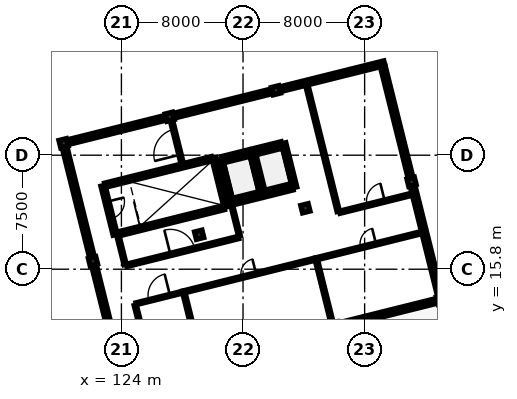
"""IFC4 building model, lengths in metres.
Left out: names, types, materials, properties, quantities, classifications, styles, units other than length and angle.
Written with IfcOpenShell. Run it as: python <this file> out.ifc"""

import sys

from ifc_helpers import new_model, si_unit, direction, frame, frame_2d, origin, origin_2d, place, context, subcontext, project, spatial, rectangle, extrude, element, fill, save


model = new_model("IFC4")
c1 = context("Model", 3, precision=1e-05, world=origin(), true_north=direction((0.0, 1.0)))
c2 = subcontext(c1, "Body", "Model", "MODEL_VIEW")
j1 = project(units=[si_unit("LENGTHUNIT", "METRE"), si_unit("PLANEANGLEUNIT", "RADIAN")], contexts=[c1])
p1 = place(None, origin())
s1 = spatial("IfcSite", under=j1, at=p1, CompositionType="ELEMENT")
p2 = place(p1, origin())
s2 = spatial("IfcBuilding", under=s1, at=p2, CompositionType="ELEMENT")
p3 = place(p2, frame((0.0, 0.0, 25.5)))
s3 = spatial("IfcBuildingStorey", under=s2, at=p3, CompositionType="ELEMENT", Elevation=25.5)
for number, where, z_axis, x_axis in (
    (1, (122.129, 16.325, 0.0), (0.0, 0.0, 1.0), (0.97, 0.242, 0.0)),
    (2, (120.194, 24.087, 0.0), (0.0, 0.0, 1.0), (0.97, 0.242, 0.0)),
):
    element("IfcColumn", number, at=place(p3, frame(where, z_axis=z_axis, x_axis=x_axis)), inside=s3, PredefinedType="COLUMN", context=c2, shape_type="SweptSolid", body=[
        extrude(rectangle(XDim=0.5, YDim=0.5, at=origin_2d()), origin(), (0.0, 0.0, 1.0), 3.819),
    ])
for number, where, z_axis, x_axis in (
    (3, (129.115, 18.067, 0.0), (0.0, 0.0, 1.0), (0.97, 0.242, 0.0)),
    (4, (127.18, 25.829, 0.0), (0.0, 0.0, 1.0), (0.97, 0.242, 0.0)),
):
    element("IfcColumn", number, at=place(p3, frame(where, z_axis=z_axis, x_axis=x_axis)), inside=s3, PredefinedType="COLUMN", context=c2, shape_type="SweptSolid", body=[
        extrude(rectangle(XDim=0.5, YDim=0.5, at=origin_2d()), origin(), (0.0, 0.0, 1.0), 4.42),
    ])
for number, where, z_axis, x_axis in (
    (5, (136.102, 19.808, 0.0), (0.0, 0.0, 1.0), (0.97, 0.242, 0.0)),
    (6, (134.166, 27.571, 0.0), (0.0, 0.0, 1.0), (0.97, 0.242, 0.0)),
):
    element("IfcColumn", number, at=place(p3, frame(where, z_axis=z_axis, x_axis=x_axis)), inside=s3, PredefinedType="COLUMN", context=c2, shape_type="SweptSolid", body=[
        extrude(rectangle(XDim=0.5, YDim=0.5, at=origin_2d()), origin(), (0.0, 0.0, 1.0), 3.818),
    ])
for number, where, z_axis, x_axis in (
    (7, (145.023, 13.788, 0.0), (0.0, 0.0, 1.0), (0.97, 0.242, 0.0)),
    (8, (143.088, 21.55, 0.0), (0.0, 0.0, 1.0), (0.97, 0.242, 0.0)),
):
    element("IfcColumn", number, at=place(p3, frame(where, z_axis=z_axis, x_axis=x_axis)), inside=s3, PredefinedType="COLUMN", context=c2, shape_type="SweptSolid", body=[
        extrude(rectangle(XDim=0.5, YDim=0.5, at=origin_2d()), origin(), (0.0, 0.0, 1.0), 4.738),
    ])
p4 = place(p3, frame((120.437, 24.147, 0.0), z_axis=(0.0, 0.0, 1.0), x_axis=(0.970288079516, 0.241952563016, 0.0)))
e9 = element("IfcWall", 9, at=p4, inside=s3, PredefinedType="SOLIDWALL", context=c2, shape_type="SweptSolid", body=[
    extrude(rectangle(XDim=6.7, YDim=0.32, at=frame_2d((3.35, 0.0))), origin(), (0.0, 0.0, 1.0), 3.7),
])
p5 = place(p4, frame((2.65, 0.0, 0.9)))
e10 = element("IfcOpeningElement", 10, at=p5, cuts=e9, PredefinedType="OPENING", context=c2, shape_type="SweptSolid", body=[
    extrude(rectangle(XDim=1.4, YDim=1.5, at=frame_2d((0.7, 0.75))), frame((0.0, 0.172, 0.0), z_axis=(0.0, -1.0, 0.0), x_axis=(1.0, 0.0, 0.0)), (0.0, 0.0, 1.0), 0.344),
])
p6 = place(p3, frame((127.423, 25.889, 0.0), z_axis=(0.0, 0.0, 1.0), x_axis=(0.970296633454, 0.241918257079, 0.0)))
e11 = element("IfcWall", 11, at=p6, inside=s3, PredefinedType="SOLIDWALL", context=c2, shape_type="SweptSolid", body=[
    extrude(rectangle(XDim=6.7, YDim=0.32, at=frame_2d((3.35, 0.0))), origin(), (0.0, 0.0, 1.0), 3.7),
])
p7 = place(p6, frame((2.65, 0.0, 0.9)))
e12 = element("IfcOpeningElement", 12, at=p7, cuts=e11, PredefinedType="OPENING", context=c2, shape_type="SweptSolid", body=[
    extrude(rectangle(XDim=1.4, YDim=1.7, at=frame_2d((0.7, 0.85))), frame((0.0, 0.172, 0.0), z_axis=(0.0, -1.0, 0.0), x_axis=(1.0, 0.0, 0.0)), (0.0, 0.0, 1.0), 0.344),
])
p8 = place(p3, frame((134.409, 27.631, 0.0), z_axis=(0.0, 0.0, 1.0), x_axis=(0.97030006528, 0.241904492141, 0.0)))
e13 = element("IfcWall", 13, at=p8, inside=s3, PredefinedType="SOLIDWALL", context=c2, shape_type="SweptSolid", body=[
    extrude(rectangle(XDim=7.1, YDim=0.32, at=frame_2d((3.55, 0.0))), origin(), (0.0, 0.0, 1.0), 3.7),
])
p9 = place(p3, frame((141.188, 29.167, 0.0), z_axis=(0.0, 0.0, 1.0), x_axis=(0.241923337436, -0.970295366785, 0.0)))
e14 = element("IfcWall", 14, at=p9, inside=s3, PredefinedType="SOLIDWALL", context=c2, shape_type="SweptSolid", body=[
    extrude(rectangle(XDim=7.6, YDim=0.32, at=frame_2d((3.8, 0.0))), origin(), (0.0, 0.0, 1.0), 3.7),
])
p10 = place(p9, frame((2.7, 0.0, 0.9)))
e15 = element("IfcOpeningElement", 15, at=p10, cuts=e14, PredefinedType="OPENING", context=c2, shape_type="SweptSolid", body=[
    extrude(rectangle(XDim=2.2, YDim=1.9, at=frame_2d((1.1, 0.95))), frame((0.0, 0.172, 0.0), z_axis=(0.0, -1.0, 0.0), x_axis=(1.0, 0.0, 0.0)), (0.0, 0.0, 1.0), 0.344),
])
p11 = place(p3, frame((143.148, 21.308, 0.0), z_axis=(0.0, 0.0, 1.0), x_axis=(0.241930483572, -0.970293585014, 0.0)))
e16 = element("IfcWall", 16, at=p11, inside=s3, PredefinedType="SOLIDWALL", context=c2, shape_type="SweptSolid", body=[
    extrude(rectangle(XDim=7.5, YDim=0.32, at=frame_2d((3.75, 0.0))), origin(), (0.0, 0.0, 1.0), 3.7),
])
p12 = place(p3, frame((144.781, 13.727, 0.0), z_axis=(0.0, 0.0, 1.0), x_axis=(-0.970296633454, -0.241918257079, 0.0)))
e17 = element("IfcWall", 17, at=p12, inside=s3, PredefinedType="SOLIDWALL", context=c2, shape_type="SweptSolid", body=[
    extrude(rectangle(XDim=6.7, YDim=0.32, at=frame_2d((3.35, 0.0))), origin(), (0.0, 0.0, 1.0), 3.7),
])
p13 = place(p12, frame((2.55, 0.0, 0.9)))
e18 = element("IfcOpeningElement", 18, at=p13, cuts=e17, PredefinedType="OPENING", context=c2, shape_type="SweptSolid", body=[
    extrude(rectangle(XDim=1.6, YDim=1.3, at=frame_2d((0.8, 0.65))), frame((0.0, 0.172, 0.0), z_axis=(0.0, -1.0, 0.0), x_axis=(1.0, 0.0, 0.0)), (0.0, 0.0, 1.0), 0.344),
])
p14 = place(p3, frame((124.004, 8.805, 0.0), z_axis=(0.0, 0.0, 1.0), x_axis=(-0.241922842305, 0.970295490235, 0.0)))
e19 = element("IfcWall", 19, at=p14, inside=s3, PredefinedType="SOLIDWALL", context=c2, shape_type="SweptSolid", body=[
    extrude(rectangle(XDim=7.5, YDim=0.32, at=frame_2d((3.75, 0.0))), origin(), (0.0, 0.0, 1.0), 3.7),
])
p15 = place(p14, frame((2.75, 0.0, 0.9)))
e20 = element("IfcOpeningElement", 20, at=p15, cuts=e19, PredefinedType="OPENING", context=c2, shape_type="SweptSolid", body=[
    extrude(rectangle(XDim=2.0, YDim=1.9, at=frame_2d((1.0, 0.95))), frame((0.0, 0.172, 0.0), z_axis=(0.0, -1.0, 0.0), x_axis=(1.0, 0.0, 0.0)), (0.0, 0.0, 1.0), 0.344),
])
p16 = place(p3, frame((122.069, 16.567, 0.0), z_axis=(0.0, 0.0, 1.0), x_axis=(-0.241930483572, 0.970293585014, 0.0)))
e21 = element("IfcWall", 21, at=p16, inside=s3, PredefinedType="SOLIDWALL", context=c2, shape_type="SweptSolid", body=[
    extrude(rectangle(XDim=7.5, YDim=0.32, at=frame_2d((3.75, 0.0))), origin(), (0.0, 0.0, 1.0), 3.7),
])
p17 = place(p16, frame((2.85, 0.0, 0.9)))
e22 = element("IfcOpeningElement", 22, at=p17, cuts=e21, PredefinedType="OPENING", context=c2, shape_type="SweptSolid", body=[
    extrude(rectangle(XDim=1.8, YDim=1.3, at=frame_2d((0.9, 0.65))), frame((0.0, 0.172, 0.0), z_axis=(0.0, -1.0, 0.0), x_axis=(1.0, 0.0, 0.0)), (0.0, 0.0, 1.0), 0.344),
])
p18 = place(p3, frame((123.731, 18.105, 0.0), z_axis=(0.0, 0.0, 1.0), x_axis=(0.970297238923, 0.241915828623, 0.0)))
e23 = element("IfcWall", 23, at=p18, inside=s3, PredefinedType="SHEAR", context=c2, shape_type="SweptSolid", body=[
    extrude(rectangle(XDim=7.23, YDim=0.28, at=frame_2d((3.615, 0.0))), origin(), (0.0, 0.0, 1.0), 3.8),
])
p19 = place(p3, frame((130.887, 19.889, 0.0), z_axis=(0.0, 0.0, 1.0), x_axis=(-0.241947258837, 0.970289402158, 0.0)))
e24 = element("IfcWall", 24, at=p19, inside=s3, PredefinedType="SHEAR", context=c2, shape_type="SweptSolid", body=[
    extrude(rectangle(XDim=3.32, YDim=0.28, at=frame_2d((1.66, 0.0))), origin(), (0.0, 0.0, 1.0), 3.8),
])
p20 = place(p3, frame((129.943, 23.076, 0.0), z_axis=(0.0, 0.0, 1.0), x_axis=(-0.970289312034, -0.241947620266, 0.0)))
e25 = element("IfcWall", 25, at=p20, inside=s3, PredefinedType="SHEAR", context=c2, shape_type="SweptSolid", body=[
    extrude(rectangle(XDim=7.23, YDim=0.28, at=frame_2d((3.615, 0.0))), origin(), (0.0, 0.0, 1.0), 3.8),
])
p21 = place(p3, frame((122.787, 21.292, 0.0), z_axis=(0.0, 0.0, 1.0), x_axis=(0.241860763027, -0.970310966293, 0.0)))
e26 = element("IfcWall", 26, at=p21, inside=s3, PredefinedType="SHEAR", context=c2, shape_type="SweptSolid", body=[
    extrude(rectangle(XDim=3.32, YDim=0.28, at=frame_2d((1.66, 0.0))), origin(), (0.0, 0.0, 1.0), 3.8),
])
p22 = place(p21, frame((1.085, 0.0, 0.0)))
e27 = element("IfcOpeningElement", 27, at=p22, cuts=e26, PredefinedType="OPENING", context=c2, shape_type="SweptSolid", body=[
    extrude(rectangle(XDim=1.15, YDim=2.15, at=frame_2d((0.575, 1.075))), frame((0.0, 0.152, 0.0), z_axis=(0.0, -1.0, 0.0), x_axis=(1.0, 0.0, 0.0)), (0.0, 0.0, 1.0), 0.304),
])
p23 = place(p3, frame((131.363, 20.176, 0.0), z_axis=(0.0, 0.0, 1.0), x_axis=(0.970284587517, 0.241966566341, 0.0)))
e28 = element("IfcWall", 28, at=p23, inside=s3, PredefinedType="SHEAR", context=c2, shape_type="SweptSolid", body=[
    extrude(rectangle(XDim=1.817, YDim=0.28, at=frame_2d((0.909, 0.0))), origin(), (0.0, 0.0, 1.0), 5.3),
])
p24 = place(p3, frame((133.267, 20.651, 0.0), z_axis=(0.0, 0.0, 1.0), x_axis=(-0.241921647353, 0.970295788171, 0.0)))
e29 = element("IfcWall", 29, at=p24, inside=s3, PredefinedType="SHEAR", context=c2, shape_type="SweptSolid", body=[
    extrude(rectangle(XDim=2.994, YDim=0.28, at=frame_2d((1.497, 0.0))), origin(), (0.0, 0.0, 1.0), 5.3),
])
p25 = place(p3, frame((132.402, 23.521, 0.0), z_axis=(0.0, 0.0, 1.0), x_axis=(-0.970284587517, -0.241966566341, 0.0)))
e30 = element("IfcWall", 30, at=p25, inside=s3, PredefinedType="SHEAR", context=c2, shape_type="SweptSolid", body=[
    extrude(rectangle(XDim=1.817, YDim=0.28, at=frame_2d((0.909, 0.0))), origin(), (0.0, 0.0, 1.0), 5.3),
])
p26 = place(p25, frame((0.259, 0.0, 0.0)))
e31 = element("IfcOpeningElement", 31, at=p26, cuts=e30, PredefinedType="OPENING", context=c2, shape_type="SweptSolid", body=[
    extrude(rectangle(XDim=1.3, YDim=2.2, at=frame_2d((0.65, 1.1))), frame((0.0, 0.152, 0.0), z_axis=(0.0, -1.0, 0.0), x_axis=(1.0, 0.0, 0.0)), (0.0, 0.0, 1.0), 0.304),
])
p27 = place(p3, frame((130.498, 23.046, 0.0), z_axis=(0.0, 0.0, 1.0), x_axis=(0.241921647353, -0.970295788171, 0.0)))
e32 = element("IfcWall", 32, at=p27, inside=s3, PredefinedType="SHEAR", context=c2, shape_type="SweptSolid", body=[
    extrude(rectangle(XDim=2.994, YDim=0.28, at=frame_2d((1.497, 0.0))), origin(), (0.0, 0.0, 1.0), 5.3),
])
p28 = place(p3, frame((133.408, 20.686, 0.0), z_axis=(0.0, 0.0, 1.0), x_axis=(0.970285190026, 0.241964150272, 0.0)))
e33 = element("IfcWall", 33, at=p28, inside=s3, PredefinedType="SHEAR", context=c2, shape_type="SweptSolid", body=[
    extrude(rectangle(XDim=1.91, YDim=0.28, at=frame_2d((0.955, 0.0))), origin(), (0.0, 0.0, 1.0), 5.3),
])
p29 = place(p3, frame((135.402, 21.183, 0.0), z_axis=(0.0, 0.0, 1.0), x_axis=(-0.241921647353, 0.970295788171, 0.0)))
e34 = element("IfcWall", 34, at=p29, inside=s3, PredefinedType="SHEAR", context=c2, shape_type="SweptSolid", body=[
    extrude(rectangle(XDim=2.994, YDim=0.28, at=frame_2d((1.497, 0.0))), origin(), (0.0, 0.0, 1.0), 5.3),
])
p30 = place(p3, frame((134.537, 24.053, 0.0), z_axis=(0.0, 0.0, 1.0), x_axis=(-0.970285190026, -0.241964150272, 0.0)))
e35 = element("IfcWall", 35, at=p30, inside=s3, PredefinedType="SHEAR", context=c2, shape_type="SweptSolid", body=[
    extrude(rectangle(XDim=1.91, YDim=0.28, at=frame_2d((0.955, 0.0))), origin(), (0.0, 0.0, 1.0), 5.3),
])
p31 = place(p30, frame((0.305, 0.0, 0.0)))
e36 = element("IfcOpeningElement", 36, at=p31, cuts=e35, PredefinedType="OPENING", context=c2, shape_type="SweptSolid", body=[
    extrude(rectangle(XDim=1.3, YDim=2.2, at=frame_2d((0.65, 1.1))), frame((0.0, 0.152, 0.0), z_axis=(0.0, -1.0, 0.0), x_axis=(1.0, 0.0, 0.0)), (0.0, 0.0, 1.0), 0.304),
])
p32 = place(p3, frame((124.346, 16.053, 0.0), z_axis=(0.0, 0.0, 1.0), x_axis=(0.970295772287, 0.241921711059, 0.0)))
e37 = element("IfcWall", 37, at=p32, inside=s3, PredefinedType="PARTITIONING", context=c2, shape_type="SweptSolid", body=[
    extrude(rectangle(XDim=7.58, YDim=0.16, at=frame_2d((3.79, 0.0))), origin(), (0.0, 0.0, 1.0), 3.7),
])
p33 = place(p32, frame((2.965, 0.0, 0.0)))
e38 = element("IfcOpeningElement", 38, at=p33, cuts=e37, PredefinedType="OPENING", context=c2, shape_type="SweptSolid", body=[
    extrude(rectangle(XDim=1.65, YDim=2.32, at=frame_2d((0.825, 1.16))), frame((0.0, 0.092, 0.0), z_axis=(0.0, -1.0, 0.0), x_axis=(1.0, 0.0, 0.0)), (0.0, 0.0, 1.0), 0.184),
])
p34 = place(p3, frame((128.0, 22.748, 0.0), z_axis=(0.0, 0.0, 1.0), x_axis=(-0.24188769692, 0.970304252324, 0.0)))
e39 = element("IfcWall", 39, at=p34, inside=s3, PredefinedType="PARTITIONING", context=c2, shape_type="SweptSolid", body=[
    extrude(rectangle(XDim=2.926, YDim=0.16, at=frame_2d((1.463, 0.0))), origin(), (0.0, 0.0, 1.0), 3.7),
])
p35 = place(p34, frame((0.603, 0.0, 0.0)))
e40 = element("IfcOpeningElement", 40, at=p35, cuts=e39, PredefinedType="OPENING", context=c2, shape_type="SweptSolid", body=[
    extrude(rectangle(XDim=1.72, YDim=2.34, at=frame_2d((0.86, 1.17))), frame((0.0, 0.092, 0.0), z_axis=(0.0, -1.0, 0.0), x_axis=(1.0, 0.0, 0.0)), (0.0, 0.0, 1.0), 0.184),
])
p36 = place(p3, frame((124.975, 13.53, 0.0), z_axis=(0.0, 0.0, 1.0), x_axis=(0.970289141252, 0.241948305158, 0.0)))
e41 = element("IfcWall", 41, at=p36, inside=s3, PredefinedType="PARTITIONING", context=c2, shape_type="SweptSolid", body=[
    extrude(rectangle(XDim=3.13, YDim=0.125, at=frame_2d((1.565, 0.0))), origin(), (0.0, 0.0, 1.0), 3.7),
])
p37 = place(p36, frame((0.845, 0.0, 0.0)))
e42 = element("IfcOpeningElement", 42, at=p37, cuts=e41, PredefinedType="OPENING", context=c2, shape_type="SweptSolid", body=[
    extrude(rectangle(XDim=1.44, YDim=2.32, at=frame_2d((0.72, 1.16))), frame((0.0, 0.074, 0.0), z_axis=(0.0, -1.0, 0.0), x_axis=(1.0, 0.0, 0.0)), (0.0, 0.0, 1.0), 0.149),
])
p38 = place(p3, frame((128.023, 14.29, 0.0), z_axis=(0.0, 0.0, 1.0), x_axis=(0.9702992324, 0.241907832869, 0.0)))
e43 = element("IfcWall", 43, at=p38, inside=s3, PredefinedType="PARTITIONING", context=c2, shape_type="SweptSolid", body=[
    extrude(rectangle(XDim=8.968, YDim=0.15, at=frame_2d((4.484, 0.0))), origin(), (0.0, 0.0, 1.0), 3.7),
])
p39 = place(p38, frame((3.984, 0.0, 0.0)))
e44 = element("IfcOpeningElement", 44, at=p39, cuts=e43, PredefinedType="OPENING", context=c2, shape_type="SweptSolid", body=[
    extrude(rectangle(XDim=1.0, YDim=2.15, at=frame_2d((0.5, 1.075))), frame((0.0, 0.087, 0.0), z_axis=(0.0, -1.0, 0.0), x_axis=(1.0, 0.0, 0.0)), (0.0, 0.0, 1.0), 0.174),
])
p40 = place(p3, frame((136.737, 16.463, 0.0), z_axis=(0.0, 0.0, 1.0), x_axis=(0.970289496005, 0.24194688248, 0.0)))
e45 = element("IfcWall", 45, at=p40, inside=s3, PredefinedType="PARTITIONING", context=c2, shape_type="SweptSolid", body=[
    extrude(rectangle(XDim=7.221, YDim=0.15, at=frame_2d((3.61, 0.0))), origin(), (0.0, 0.0, 1.0), 3.7),
])
p41 = place(p40, frame((3.085, 0.0, 0.0)))
e46 = element("IfcOpeningElement", 46, at=p41, cuts=e45, PredefinedType="OPENING", context=c2, shape_type="SweptSolid", body=[
    extrude(rectangle(XDim=1.05, YDim=2.15, at=frame_2d((0.525, 1.075))), frame((0.0, 0.087, 0.0), z_axis=(0.0, -1.0, 0.0), x_axis=(1.0, 0.0, 0.0)), (0.0, 0.0, 1.0), 0.174),
])
p42 = place(p3, frame((138.367, 19.549, 0.0), z_axis=(0.0, 0.0, 1.0), x_axis=(0.970289077222, 0.241948561938, 0.0)))
e47 = element("IfcWall", 47, at=p42, inside=s3, PredefinedType="PARTITIONING", context=c2, shape_type="SweptSolid", body=[
    extrude(rectangle(XDim=4.893, YDim=0.15, at=frame_2d((2.446, 0.0))), origin(), (0.0, 0.0, 1.0), 3.7),
])
p43 = place(p42, frame((1.846, 0.0, 0.0)))
e48 = element("IfcOpeningElement", 48, at=p43, cuts=e47, PredefinedType="OPENING", context=c2, shape_type="SweptSolid", body=[
    extrude(rectangle(XDim=1.2, YDim=2.15, at=frame_2d((0.6, 1.075))), frame((0.0, 0.087, 0.0), z_axis=(0.0, -1.0, 0.0), x_axis=(1.0, 0.0, 0.0)), (0.0, 0.0, 1.0), 0.174),
])
p44 = place(p3, frame((124.243, 16.115, 0.0), z_axis=(0.0, 0.0, 1.0), x_axis=(-0.241962034071, 0.970285717749, 0.0)))
e49 = element("IfcWall", 49, at=p44, inside=s3, PredefinedType="PARTITIONING", context=c2, shape_type="SweptSolid", body=[
    extrude(rectangle(XDim=1.903, YDim=0.15, at=frame_2d((0.952, 0.0))), origin(), (0.0, 0.0, 1.0), 3.7),
])
p45 = place(p3, frame((131.763, 17.99, 0.0), z_axis=(0.0, 0.0, 1.0), x_axis=(-0.241962612769, 0.970285573438, 0.0)))
e50 = element("IfcWall", 50, at=p45, inside=s3, PredefinedType="PARTITIONING", context=c2, shape_type="SweptSolid", body=[
    extrude(rectangle(XDim=2.206, YDim=0.125, at=frame_2d((1.103, 0.0))), origin(), (0.0, 0.0, 1.0), 3.7),
])
p46 = place(p3, frame((126.607, 6.632, 0.0), z_axis=(0.0, 0.0, 1.0), x_axis=(-0.241944970231, 0.970289972833, 0.0)))
e51 = element("IfcWall", 51, at=p46, inside=s3, PredefinedType="PARTITIONING", context=c2, shape_type="SweptSolid", body=[
    extrude(rectangle(XDim=7.003, YDim=0.15, at=frame_2d((3.501, 0.0))), origin(), (0.0, 0.0, 1.0), 3.7),
])
p47 = place(p3, frame((129.809, 7.43, 0.0), z_axis=(0.0, 0.0, 1.0), x_axis=(-0.241911968874, 0.970298201233, 0.0)))
e52 = element("IfcWall", 52, at=p47, inside=s3, PredefinedType="PARTITIONING", context=c2, shape_type="SweptSolid", body=[
    extrude(rectangle(XDim=7.001, YDim=0.16, at=frame_2d((3.5, 0.0))), origin(), (0.0, 0.0, 1.0), 3.7),
])
p48 = place(p3, frame((137.87, 12.22, 0.0), z_axis=(0.0, 0.0, 1.0), x_axis=(-0.241948270812, 0.970289149816, 0.0)))
e53 = element("IfcWall", 53, at=p48, inside=s3, PredefinedType="PARTITIONING", context=c2, shape_type="SweptSolid", body=[
    extrude(rectangle(XDim=4.304, YDim=0.16, at=frame_2d((2.152, 0.0))), origin(), (0.0, 0.0, 1.0), 3.7),
])
p49 = place(p3, frame((138.264, 19.611, 0.0), z_axis=(0.0, 0.0, 1.0), x_axis=(-0.241937132378, 0.970291927193, 0.0)))
e54 = element("IfcWall", 54, at=p49, inside=s3, PredefinedType="PARTITIONING", context=c2, shape_type="SweptSolid", body=[
    extrude(rectangle(XDim=8.543, YDim=0.16, at=frame_2d((4.271, 0.0))), origin(), (0.0, 0.0, 1.0), 3.7),
])
p50 = place(p5, origin())
e55 = element("IfcWindow", 55, at=p50, inside=s3, PartitioningType="SINGLE_PANEL", PredefinedType="WINDOW", context=c2, shape_type="SweptSolid", body=[
    extrude(rectangle(XDim=1.4, YDim=1.5, at=frame_2d((0.7, 0.75))), frame((0.0, 0.03, 0.0), z_axis=(0.0, -1.0, 0.0), x_axis=(1.0, 0.0, 0.0)), (0.0, 0.0, 1.0), 0.06),
])
fill(e10, e55)
p51 = place(p7, origin())
e56 = element("IfcWindow", 56, at=p51, inside=s3, PartitioningType="SINGLE_PANEL", PredefinedType="WINDOW", context=c2, shape_type="SweptSolid", body=[
    extrude(rectangle(XDim=1.4, YDim=1.7, at=frame_2d((0.7, 0.85))), frame((0.0, 0.03, 0.0), z_axis=(0.0, -1.0, 0.0), x_axis=(1.0, 0.0, 0.0)), (0.0, 0.0, 1.0), 0.06),
])
fill(e12, e56)
p52 = place(p10, origin())
e57 = element("IfcWindow", 57, at=p52, inside=s3, PartitioningType="DOUBLE_PANEL_VERTICAL", PredefinedType="WINDOW", context=c2, shape_type="SweptSolid", body=[
    extrude(rectangle(XDim=2.2, YDim=1.9, at=frame_2d((1.1, 0.95))), frame((0.0, 0.03, 0.0), z_axis=(0.0, -1.0, 0.0), x_axis=(1.0, 0.0, 0.0)), (0.0, 0.0, 1.0), 0.06),
])
fill(e15, e57)
p53 = place(p13, origin())
e58 = element("IfcWindow", 58, at=p53, inside=s3, PartitioningType="DOUBLE_PANEL_VERTICAL", PredefinedType="WINDOW", context=c2, shape_type="SweptSolid", body=[
    extrude(rectangle(XDim=1.6, YDim=1.3, at=frame_2d((0.8, 0.65))), frame((0.0, 0.03, 0.0), z_axis=(0.0, -1.0, 0.0), x_axis=(1.0, 0.0, 0.0)), (0.0, 0.0, 1.0), 0.06),
])
fill(e18, e58)
p54 = place(p15, origin())
e59 = element("IfcWindow", 59, at=p54, inside=s3, PartitioningType="DOUBLE_PANEL_VERTICAL", PredefinedType="WINDOW", context=c2, shape_type="SweptSolid", body=[
    extrude(rectangle(XDim=2.0, YDim=1.9, at=frame_2d((1.0, 0.95))), frame((0.0, 0.03, 0.0), z_axis=(0.0, -1.0, 0.0), x_axis=(1.0, 0.0, 0.0)), (0.0, 0.0, 1.0), 0.06),
])
fill(e20, e59)
p55 = place(p17, origin())
e60 = element("IfcWindow", 60, at=p55, inside=s3, PartitioningType="DOUBLE_PANEL_VERTICAL", PredefinedType="WINDOW", context=c2, shape_type="SweptSolid", body=[
    extrude(rectangle(XDim=1.8, YDim=1.3, at=frame_2d((0.9, 0.65))), frame((0.0, 0.03, 0.0), z_axis=(0.0, -1.0, 0.0), x_axis=(1.0, 0.0, 0.0)), (0.0, 0.0, 1.0), 0.06),
])
fill(e22, e60)
p56 = place(p22, origin())
e61 = element("IfcDoor", 61, at=p56, inside=s3, OperationType="SINGLE_SWING_LEFT", PredefinedType="DOOR", context=c2, shape_type="SweptSolid", body=[
    extrude(rectangle(XDim=1.15, YDim=2.15, at=frame_2d((0.575, 1.075))), frame((0.0, 0.025, 0.0), z_axis=(0.0, -1.0, 0.0), x_axis=(1.0, 0.0, 0.0)), (0.0, 0.0, 1.0), 0.05),
])
fill(e27, e61)
p57 = place(p26, origin())
e62 = element("IfcDoor", 62, at=p57, inside=s3, OperationType="SLIDING_TO_LEFT", PredefinedType="DOOR", context=c2, shape_type="SweptSolid", body=[
    extrude(rectangle(XDim=1.3, YDim=2.2, at=frame_2d((0.65, 1.1))), frame((0.0, 0.025, 0.0), z_axis=(0.0, -1.0, 0.0), x_axis=(1.0, 0.0, 0.0)), (0.0, 0.0, 1.0), 0.05),
])
fill(e31, e62)
p58 = place(p31, origin())
e63 = element("IfcDoor", 63, at=p58, inside=s3, OperationType="SLIDING_TO_RIGHT", PredefinedType="DOOR", context=c2, shape_type="SweptSolid", body=[
    extrude(rectangle(XDim=1.3, YDim=2.2, at=frame_2d((0.65, 1.1))), frame((0.0, 0.025, 0.0), z_axis=(0.0, -1.0, 0.0), x_axis=(1.0, 0.0, 0.0)), (0.0, 0.0, 1.0), 0.05),
])
fill(e36, e63)
p59 = place(p33, origin())
e64 = element("IfcDoor", 64, at=p59, inside=s3, OperationType="SINGLE_SWING_LEFT", PredefinedType="DOOR", context=c2, shape_type="SweptSolid", body=[
    extrude(rectangle(XDim=1.65, YDim=2.32, at=frame_2d((0.825, 1.16))), frame((0.0, 0.025, 0.0), z_axis=(0.0, -1.0, 0.0), x_axis=(1.0, 0.0, 0.0)), (0.0, 0.0, 1.0), 0.05),
])
fill(e38, e64)
p60 = place(p35, origin())
e65 = element("IfcDoor", 65, at=p60, inside=s3, OperationType="SINGLE_SWING_LEFT", PredefinedType="DOOR", context=c2, shape_type="SweptSolid", body=[
    extrude(rectangle(XDim=1.72, YDim=2.34, at=frame_2d((0.86, 1.17))), frame((0.0, 0.025, 0.0), z_axis=(0.0, -1.0, 0.0), x_axis=(1.0, 0.0, 0.0)), (0.0, 0.0, 1.0), 0.05),
])
fill(e40, e65)
p61 = place(p37, origin())
e66 = element("IfcDoor", 66, at=p61, inside=s3, OperationType="SINGLE_SWING_RIGHT", PredefinedType="DOOR", context=c2, shape_type="SweptSolid", body=[
    extrude(rectangle(XDim=1.44, YDim=2.32, at=frame_2d((0.72, 1.16))), frame((0.0, 0.025, 0.0), z_axis=(0.0, -1.0, 0.0), x_axis=(1.0, 0.0, 0.0)), (0.0, 0.0, 1.0), 0.05),
])
fill(e42, e66)
p62 = place(p39, origin())
e67 = element("IfcDoor", 67, at=p62, inside=s3, OperationType="SINGLE_SWING_RIGHT", PredefinedType="DOOR", context=c2, shape_type="SweptSolid", body=[
    extrude(rectangle(XDim=1.0, YDim=2.15, at=frame_2d((0.5, 1.075))), frame((0.0, 0.025, 0.0), z_axis=(0.0, -1.0, 0.0), x_axis=(1.0, 0.0, 0.0)), (0.0, 0.0, 1.0), 0.05),
])
fill(e44, e67)
p63 = place(p41, origin())
e68 = element("IfcDoor", 68, at=p63, inside=s3, OperationType="SINGLE_SWING_RIGHT", PredefinedType="DOOR", context=c2, shape_type="SweptSolid", body=[
    extrude(rectangle(XDim=1.05, YDim=2.15, at=frame_2d((0.525, 1.075))), frame((0.0, 0.025, 0.0), z_axis=(0.0, -1.0, 0.0), x_axis=(1.0, 0.0, 0.0)), (0.0, 0.0, 1.0), 0.05),
])
fill(e46, e68)
p64 = place(p43, origin())
e69 = element("IfcDoor", 69, at=p64, inside=s3, OperationType="SINGLE_SWING_RIGHT", PredefinedType="DOOR", context=c2, shape_type="SweptSolid", body=[
    extrude(rectangle(XDim=1.2, YDim=2.15, at=frame_2d((0.6, 1.075))), frame((0.0, 0.025, 0.0), z_axis=(0.0, -1.0, 0.0), x_axis=(1.0, 0.0, 0.0)), (0.0, 0.0, 1.0), 0.05),
])
fill(e48, e69)
save(model, sys.argv[1])
